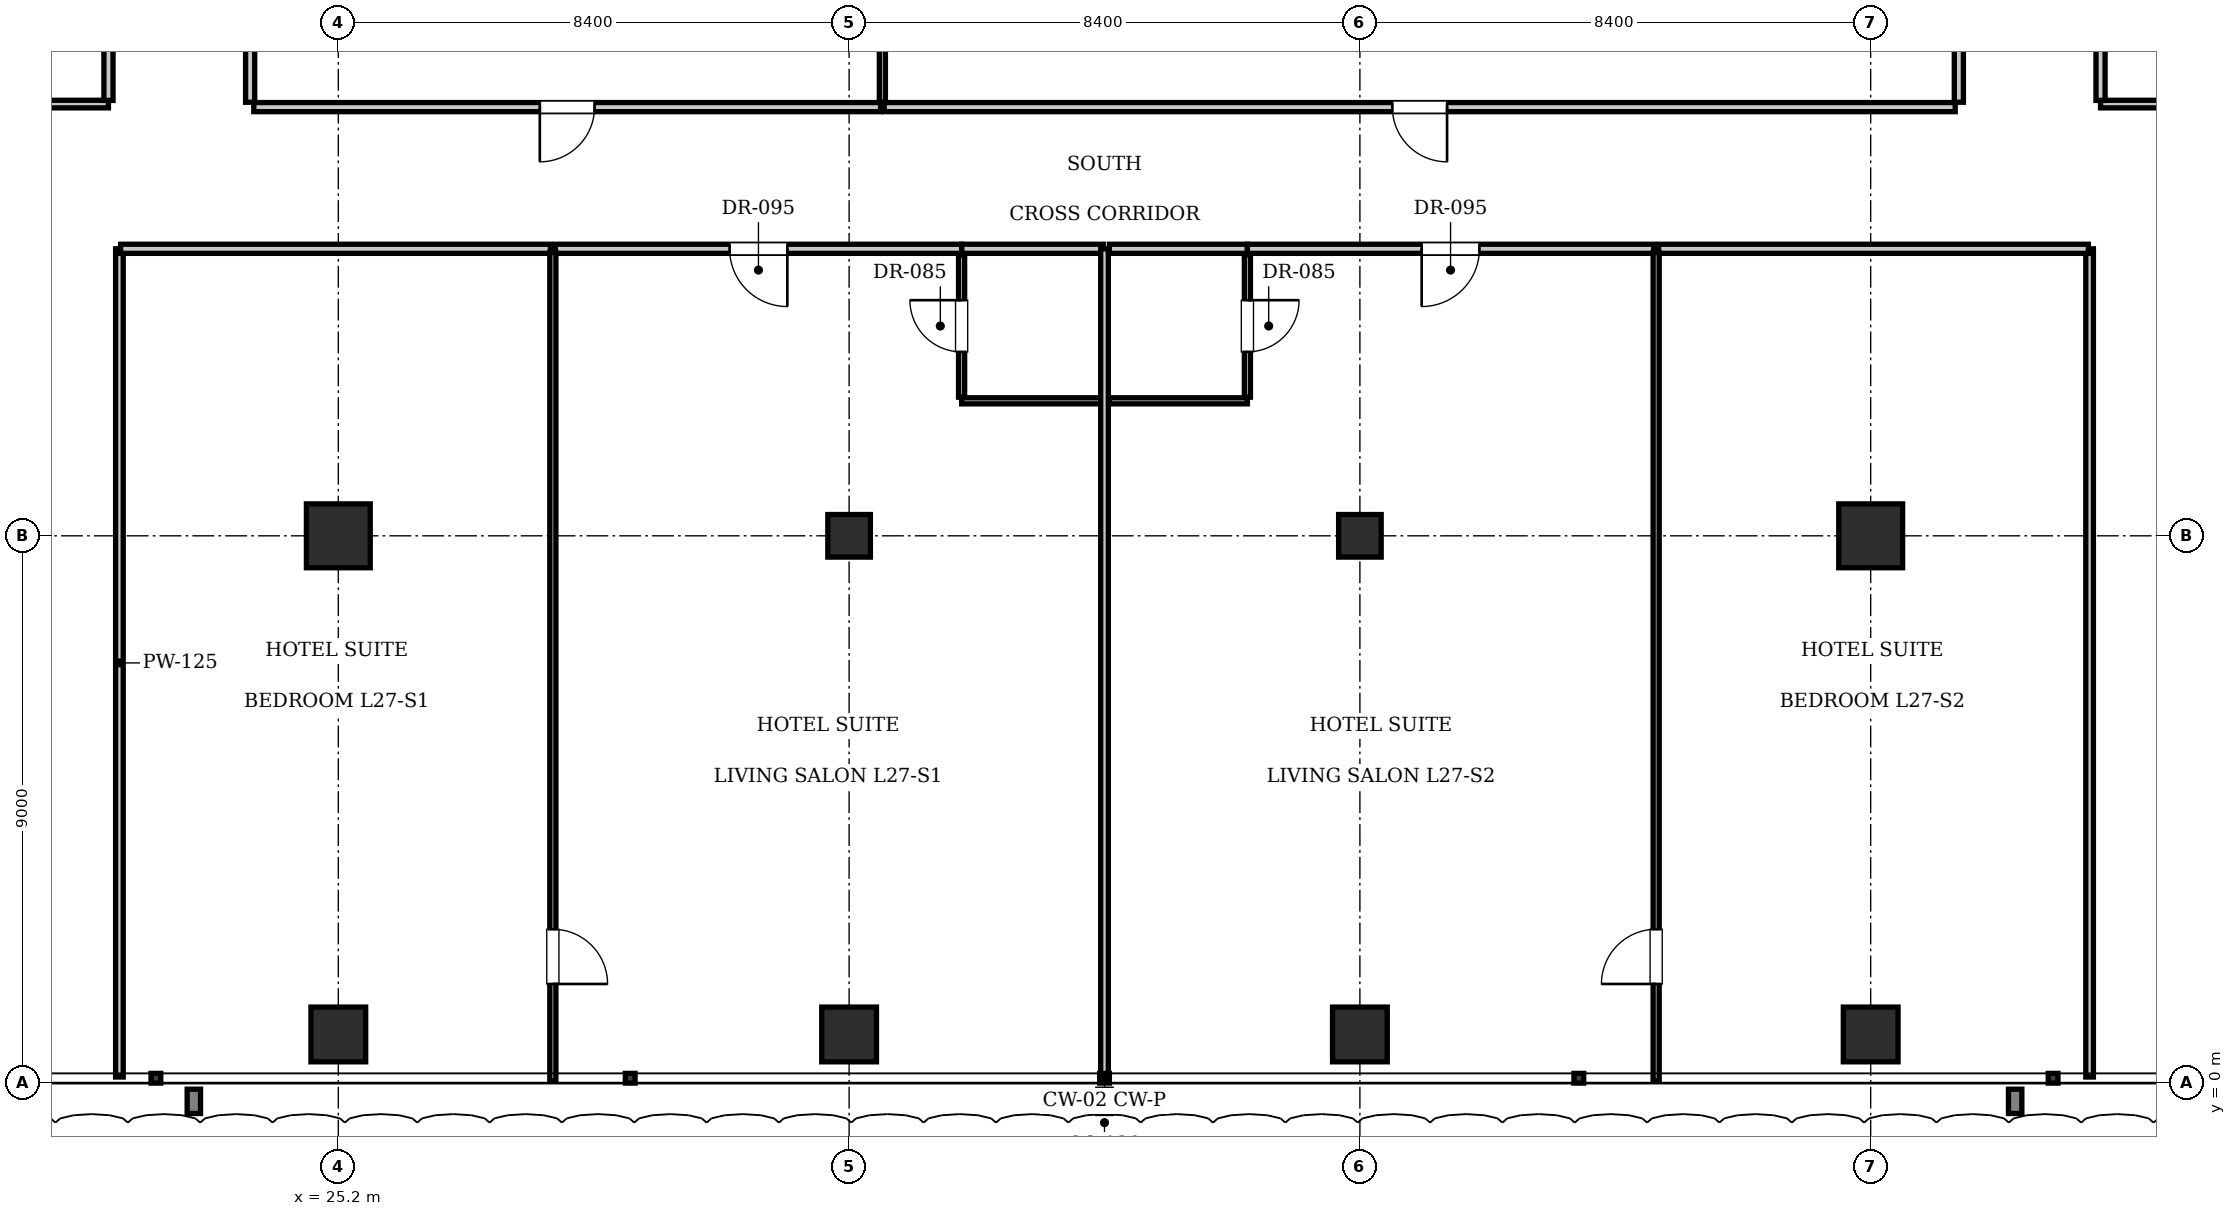
"""IFC4 building model, lengths in metres.
Left out: names, types, materials, properties, quantities, classifications, styles, units other than length and angle.
Written with IfcOpenShell. Run it as: python <this file> out.ifc"""

import sys

from ifc_helpers import new_model, si_unit, direction, frame, frame_2d, origin, origin_2d, place, context, subcontext, project, spatial, rectangle, i_section, extrude, element, fill, save


model = new_model("IFC4")
c1 = context("Model", 3, precision=1e-05, world=origin(), true_north=direction((0.0, 1.0)))
c2 = subcontext(c1, "Body", "Model", "MODEL_VIEW")
j1 = project(units=[si_unit("LENGTHUNIT", "METRE"), si_unit("PLANEANGLEUNIT", "RADIAN")], contexts=[c1])
p1 = place(None, origin())
s1 = spatial("IfcSite", under=j1, at=p1, CompositionType="ELEMENT")
p2 = place(p1, origin())
s2 = spatial("IfcBuilding", under=s1, at=p2, CompositionType="ELEMENT")
p3 = place(p2, frame((0.0, 0.0, 111.65)))
s3 = spatial("IfcBuildingStorey", under=s2, at=p3, CompositionType="ELEMENT", Elevation=111.65)
for number, where, z_axis, x_axis in (
    (1, (25.2, 9.0, 0.0), (0.0, 0.0, 1.0), (1.0, 0.0, 0.0)),
    (2, (50.4, 9.0, 0.0), (0.0, 0.0, 1.0), (1.0, 0.0, 0.0)),
):
    element("IfcColumn", number, at=place(p3, frame(where, z_axis=z_axis, x_axis=x_axis)), inside=s3, PredefinedType="COLUMN", context=c2, shape_type="SweptSolid", body=[
        extrude(rectangle(XDim=1.05, YDim=1.05, at=origin_2d()), origin(), (0.0, 0.0, 1.0), 3.85),
    ])
for number, where, z_axis, x_axis in (
    (3, (33.6, 9.0, 0.0), (0.0, 0.0, 1.0), (1.0, 0.0, 0.0)),
    (4, (42.0, 9.0, 0.0), (0.0, 0.0, 1.0), (1.0, 0.0, 0.0)),
):
    element("IfcColumn", number, at=place(p3, frame(where, z_axis=z_axis, x_axis=x_axis)), inside=s3, PredefinedType="COLUMN", context=c2, shape_type="SweptSolid", body=[
        extrude(i_section(OverallWidth=0.7, OverallDepth=0.7, WebThickness=0.028, FlangeThickness=0.044, at=origin_2d()), origin(), (0.0, 0.0, 1.0), 3.85),
    ])
for number, where, z_axis, x_axis in (
    (5, (25.2, 0.8, 0.0), (0.0, 0.0, 1.0), (1.0, 0.0, 0.0)),
    (6, (33.6, 0.8, 0.0), (0.0, 0.0, 1.0), (1.0, 0.0, 0.0)),
    (7, (42.0, 0.8, 0.0), (0.0, 0.0, 1.0), (1.0, 0.0, 0.0)),
    (8, (50.4, 0.8, 0.0), (0.0, 0.0, 1.0), (1.0, 0.0, 0.0)),
):
    element("IfcColumn", number, at=place(p3, frame(where, z_axis=z_axis, x_axis=x_axis)), inside=s3, PredefinedType="COLUMN", context=c2, shape_type="SweptSolid", body=[
        extrude(rectangle(XDim=0.9, YDim=0.9, at=origin_2d()), origin(), (0.0, 0.0, 1.0), 3.85),
    ])
for number, where, z_axis, x_axis in (
    (9, (23.75, 16.13, 0.0), (0.0, 0.0, 1.0), (0.0, 1.0, 0.0)),
    (10, (51.85, 16.13, 0.0), (0.0, 0.0, 1.0), (0.0, 1.0, 0.0)),
):
    element("IfcWall", number, at=place(p3, frame(where, z_axis=z_axis, x_axis=x_axis)), inside=s3, PredefinedType="PARTITIONING", context=c2, shape_type="SweptSolid", body=[
        extrude(rectangle(XDim=7.74, YDim=0.15, at=frame_2d((3.87, 0.0))), origin(), (0.0, 0.0, 1.0), 3.55),
    ])
p4 = place(p3, frame((23.81, 16.05, 0.0), z_axis=(0.0, 0.0, 1.0), x_axis=(1.0, 0.0, 0.0)))
e11 = element("IfcWall", 11, at=p4, inside=s3, PredefinedType="PARTITIONING", context=c2, shape_type="SweptSolid", body=[
    extrude(rectangle(XDim=10.307, YDim=0.15, at=frame_2d((5.153, 0.0))), origin(), (0.0, 0.0, 1.0), 3.55),
])
p5 = place(p4, frame((4.704, 0.0, 0.0)))
e12 = element("IfcOpeningElement", 12, at=p5, cuts=e11, PredefinedType="OPENING", context=c2, shape_type="SweptSolid", body=[
    extrude(rectangle(XDim=0.9, YDim=2.1, at=frame_2d((0.45, 1.05))), frame((0.0, 0.085, 0.0), z_axis=(0.0, -1.0, 0.0), x_axis=(1.0, 0.0, 0.0)), (0.0, 0.0, 1.0), 0.17),
])
p6 = place(p3, frame((34.147, 16.13, 0.0), z_axis=(0.0, 0.0, 1.0), x_axis=(0.0, 1.0, 0.0)))
e13 = element("IfcWall", 13, at=p6, inside=s3, PredefinedType="PARTITIONING", context=c2, shape_type="SweptSolid", body=[
    extrude(rectangle(XDim=7.74, YDim=0.1, at=frame_2d((3.87, 0.0))), origin(), (0.0, 0.0, 1.0), 3.55),
])
p7 = place(p3, frame((34.177, 16.05, 0.0), z_axis=(0.0, 0.0, 1.0), x_axis=(1.0, 0.0, 0.0)))
e14 = element("IfcWall", 14, at=p7, inside=s3, PredefinedType="PARTITIONING", context=c2, shape_type="SweptSolid", body=[
    extrude(rectangle(XDim=17.613, YDim=0.15, at=frame_2d((8.807, 0.0))), origin(), (0.0, 0.0, 1.0), 3.55),
])
p8 = place(p7, frame((8.356, 0.0, 0.0)))
e15 = element("IfcOpeningElement", 15, at=p8, cuts=e14, PredefinedType="OPENING", context=c2, shape_type="SweptSolid", body=[
    extrude(rectangle(XDim=0.9, YDim=2.1, at=frame_2d((0.45, 1.05))), frame((0.0, 0.085, 0.0), z_axis=(0.0, -1.0, 0.0), x_axis=(1.0, 0.0, 0.0)), (0.0, 0.0, 1.0), 0.17),
])
for number, where, z_axis, x_axis in (
    (16, (21.6, 0.1, 0.0), (0.0, 0.0, 1.0), (0.0, 1.0, 0.0)),
    (17, (54.0, 0.1, 0.0), (0.0, 0.0, 1.0), (0.0, 1.0, 0.0)),
):
    element("IfcWall", number, at=place(p3, frame(where, z_axis=z_axis, x_axis=x_axis)), inside=s3, PredefinedType="PARTITIONING", context=c2, shape_type="SweptSolid", body=[
        extrude(rectangle(XDim=13.62, YDim=0.125, at=frame_2d((6.81, 0.0))), origin(), (0.0, 0.0, 1.0), 3.55),
    ])
p9 = place(p3, frame((35.45, 13.72, 0.0), z_axis=(0.0, 0.0, 1.0), x_axis=(1.0, 0.0, 0.0)))
e18 = element("IfcWall", 18, at=p9, inside=s3, PredefinedType="PARTITIONING", context=c2, shape_type="SweptSolid", body=[
    extrude(rectangle(XDim=2.33, YDim=0.15, at=frame_2d((1.165, 0.0))), origin(), (0.0, 0.0, 1.0), 3.55),
])
p10 = place(p3, frame((35.45, 11.22, 0.0), z_axis=(0.0, 0.0, 1.0), x_axis=(1.0, 0.0, 0.0)))
e19 = element("IfcWall", 19, at=p10, inside=s3, PredefinedType="PARTITIONING", context=c2, shape_type="SweptSolid", body=[
    extrude(rectangle(XDim=2.31, YDim=0.1, at=frame_2d((1.155, 0.0))), origin(), (0.0, 0.0, 1.0), 3.55),
])
p11 = place(p3, frame((35.45, 11.28, 0.0), z_axis=(0.0, 0.0, 1.0), x_axis=(0.0, 1.0, 0.0)))
e20 = element("IfcWall", 20, at=p11, inside=s3, PredefinedType="PARTITIONING", context=c2, shape_type="SweptSolid", body=[
    extrude(rectangle(XDim=2.34, YDim=0.1, at=frame_2d((1.17, 0.0))), origin(), (0.0, 0.0, 1.0), 3.55),
])
p12 = place(p11, frame((0.745, 0.0, 0.0)))
e21 = element("IfcOpeningElement", 21, at=p12, cuts=e20, PredefinedType="OPENING", context=c2, shape_type="SweptSolid", body=[
    extrude(rectangle(XDim=0.85, YDim=2.1, at=frame_2d((0.425, 1.05))), frame((0.0, 0.06, 0.0), z_axis=(0.0, -1.0, 0.0), x_axis=(1.0, 0.0, 0.0)), (0.0, 0.0, 1.0), 0.12),
])
p13 = place(p3, frame((21.62, 13.72, 0.0), z_axis=(0.0, 0.0, 1.0), x_axis=(1.0, 0.0, 0.0)))
e22 = element("IfcWall", 22, at=p13, inside=s3, PredefinedType="PARTITIONING", context=c2, shape_type="SweptSolid", body=[
    extrude(rectangle(XDim=7.068, YDim=0.15, at=frame_2d((3.534, 0.0))), origin(), (0.0, 0.0, 1.0), 3.55),
])
p14 = place(p3, frame((28.768, 13.72, 0.0), z_axis=(0.0, 0.0, 1.0), x_axis=(1.0, 0.0, 0.0)))
e23 = element("IfcWall", 23, at=p14, inside=s3, PredefinedType="PARTITIONING", context=c2, shape_type="SweptSolid", body=[
    extrude(rectangle(XDim=6.682, YDim=0.15, at=frame_2d((3.341, 0.0))), origin(), (0.0, 0.0, 1.0), 3.55),
])
p15 = place(p14, frame((2.866, 0.0, 0.0)))
e24 = element("IfcOpeningElement", 24, at=p15, cuts=e23, PredefinedType="OPENING", context=c2, shape_type="SweptSolid", body=[
    extrude(rectangle(XDim=0.95, YDim=2.15, at=frame_2d((0.475, 1.075))), frame((0.0, 0.085, 0.0), z_axis=(0.0, -1.0, 0.0), x_axis=(1.0, 0.0, 0.0)), (0.0, 0.0, 1.0), 0.17),
])
p16 = place(p3, frame((28.728, 0.03, 0.0), z_axis=(0.0, 0.0, 1.0), x_axis=(0.0, 1.0, 0.0)))
e25 = element("IfcWall", 25, at=p16, inside=s3, PredefinedType="PARTITIONING", context=c2, shape_type="SweptSolid", body=[
    extrude(rectangle(XDim=13.63, YDim=0.1, at=frame_2d((6.815, 0.0))), origin(), (0.0, 0.0, 1.0), 3.55),
])
p17 = place(p16, frame((1.6, 0.0, 0.0)))
e26 = element("IfcOpeningElement", 26, at=p17, cuts=e25, PredefinedType="OPENING", context=c2, shape_type="SweptSolid", body=[
    extrude(rectangle(XDim=0.9, YDim=2.1, at=frame_2d((0.45, 1.05))), frame((0.0, 0.06, 0.0), z_axis=(0.0, -1.0, 0.0), x_axis=(1.0, 0.0, 0.0)), (0.0, 0.0, 1.0), 0.12),
])
p18 = place(p3, frame((37.8, 0.1, 0.0), z_axis=(0.0, 0.0, 1.0), x_axis=(0.0, 1.0, 0.0)))
e27 = element("IfcWall", 27, at=p18, inside=s3, PredefinedType="PARTITIONING", context=c2, shape_type="SweptSolid", body=[
    extrude(rectangle(XDim=13.62, YDim=0.125, at=frame_2d((6.81, 0.0))), origin(), (0.0, 0.0, 1.0), 3.147),
])
p19 = place(p3, frame((37.88, 13.72, 0.0), z_axis=(0.0, 0.0, 1.0), x_axis=(1.0, 0.0, 0.0)))
e28 = element("IfcWall", 28, at=p19, inside=s3, PredefinedType="PARTITIONING", context=c2, shape_type="SweptSolid", body=[
    extrude(rectangle(XDim=2.27, YDim=0.15, at=frame_2d((1.135, 0.0))), origin(), (0.0, 0.0, 1.0), 3.55),
])
p20 = place(p3, frame((37.88, 11.22, 0.0), z_axis=(0.0, 0.0, 1.0), x_axis=(1.0, 0.0, 0.0)))
e29 = element("IfcWall", 29, at=p20, inside=s3, PredefinedType="PARTITIONING", context=c2, shape_type="SweptSolid", body=[
    extrude(rectangle(XDim=2.27, YDim=0.1, at=frame_2d((1.135, 0.0))), origin(), (0.0, 0.0, 1.0), 3.55),
])
p21 = place(p3, frame((40.15, 11.28, 0.0), z_axis=(0.0, 0.0, 1.0), x_axis=(0.0, 1.0, 0.0)))
e30 = element("IfcWall", 30, at=p21, inside=s3, PredefinedType="PARTITIONING", context=c2, shape_type="SweptSolid", body=[
    extrude(rectangle(XDim=2.34, YDim=0.1, at=frame_2d((1.17, 0.0))), origin(), (0.0, 0.0, 1.0), 3.55),
])
p22 = place(p21, frame((0.745, 0.0, 0.0)))
e31 = element("IfcOpeningElement", 31, at=p22, cuts=e30, PredefinedType="OPENING", context=c2, shape_type="SweptSolid", body=[
    extrude(rectangle(XDim=0.85, YDim=2.1, at=frame_2d((0.425, 1.05))), frame((0.0, 0.06, 0.0), z_axis=(0.0, -1.0, 0.0), x_axis=(1.0, 0.0, 0.0)), (0.0, 0.0, 1.0), 0.12),
])
p23 = place(p3, frame((40.15, 13.72, 0.0), z_axis=(0.0, 0.0, 1.0), x_axis=(1.0, 0.0, 0.0)))
e32 = element("IfcWall", 32, at=p23, inside=s3, PredefinedType="PARTITIONING", context=c2, shape_type="SweptSolid", body=[
    extrude(rectangle(XDim=6.682, YDim=0.15, at=frame_2d((3.341, 0.0))), origin(), (0.0, 0.0, 1.0), 3.55),
])
p24 = place(p23, frame((2.866, 0.0, 0.0)))
e33 = element("IfcOpeningElement", 33, at=p24, cuts=e32, PredefinedType="OPENING", context=c2, shape_type="SweptSolid", body=[
    extrude(rectangle(XDim=0.95, YDim=2.15, at=frame_2d((0.475, 1.075))), frame((0.0, 0.085, 0.0), z_axis=(0.0, -1.0, 0.0), x_axis=(1.0, 0.0, 0.0)), (0.0, 0.0, 1.0), 0.17),
])
p25 = place(p3, frame((46.912, 13.72, 0.0), z_axis=(0.0, 0.0, 1.0), x_axis=(1.0, 0.0, 0.0)))
e34 = element("IfcWall", 34, at=p25, inside=s3, PredefinedType="PARTITIONING", context=c2, shape_type="SweptSolid", body=[
    extrude(rectangle(XDim=7.068, YDim=0.15, at=frame_2d((3.534, 0.0))), origin(), (0.0, 0.0, 1.0), 3.55),
])
p26 = place(p3, frame((46.872, 0.03, 0.0), z_axis=(0.0, 0.0, 1.0), x_axis=(0.0, 1.0, 0.0)))
e35 = element("IfcWall", 35, at=p26, inside=s3, PredefinedType="PARTITIONING", context=c2, shape_type="SweptSolid", body=[
    extrude(rectangle(XDim=13.63, YDim=0.1, at=frame_2d((6.815, 0.0))), origin(), (0.0, 0.0, 1.0), 3.55),
])
p27 = place(p26, frame((1.6, 0.0, 0.0)))
e36 = element("IfcOpeningElement", 36, at=p27, cuts=e35, PredefinedType="OPENING", context=c2, shape_type="SweptSolid", body=[
    extrude(rectangle(XDim=0.9, YDim=2.1, at=frame_2d((0.45, 1.05))), frame((0.0, 0.06, 0.0), z_axis=(0.0, -1.0, 0.0), x_axis=(1.0, 0.0, 0.0)), (0.0, 0.0, 1.0), 0.12),
])
for number, where, z_axis, x_axis in (
    (37, (10.9, 16.1, 0.0), (0.0, 0.0, 1.0), (1.0, 0.0, 0.0)),
    (38, (54.18, 16.1, 0.0), (0.0, 0.0, 1.0), (1.0, 0.0, 0.0)),
):
    element("IfcWall", number, at=place(p3, frame(where, z_axis=z_axis, x_axis=x_axis)), inside=s3, PredefinedType="PARTITIONING", context=c2, shape_type="SweptSolid", body=[
        extrude(rectangle(XDim=10.52, YDim=0.125, at=frame_2d((5.26, 0.0))), origin(), (0.0, 0.0, 1.0), 3.55),
    ])
p28 = place(p3, frame((21.42, 16.16, 0.0), z_axis=(0.0, 0.0, 1.0), x_axis=(0.0, 1.0, 0.0)))
e39 = element("IfcWall", 39, at=p28, inside=s3, PredefinedType="PARTITIONING", context=c2, shape_type="SweptSolid", body=[
    extrude(rectangle(XDim=5.54, YDim=0.15, at=frame_2d((2.77, 0.0))), origin(), (0.0, 0.0, 1.0), 3.55),
])
p29 = place(p28, frame((2.295, 0.0, 0.0)))
e40 = element("IfcOpeningElement", 40, at=p29, cuts=e39, PredefinedType="OPENING", context=c2, shape_type="SweptSolid", body=[
    extrude(rectangle(XDim=0.95, YDim=2.15, at=frame_2d((0.475, 1.075))), frame((0.0, 0.085, 0.0), z_axis=(0.0, -1.0, 0.0), x_axis=(1.0, 0.0, 0.0)), (0.0, 0.0, 1.0), 0.17),
])
p30 = place(p3, frame((54.18, 16.16, 0.0), z_axis=(0.0, 0.0, 1.0), x_axis=(0.0, 1.0, 0.0)))
e41 = element("IfcWall", 41, at=p30, inside=s3, PredefinedType="PARTITIONING", context=c2, shape_type="SweptSolid", body=[
    extrude(rectangle(XDim=5.54, YDim=0.15, at=frame_2d((2.77, 0.0))), origin(), (0.0, 0.0, 1.0), 3.55),
])
p31 = place(p30, frame((2.295, 0.0, 0.0)))
e42 = element("IfcOpeningElement", 42, at=p31, cuts=e41, PredefinedType="OPENING", context=c2, shape_type="SweptSolid", body=[
    extrude(rectangle(XDim=0.95, YDim=2.15, at=frame_2d((0.475, 1.075))), frame((0.0, 0.085, 0.0), z_axis=(0.0, -1.0, 0.0), x_axis=(1.0, 0.0, 0.0)), (0.0, 0.0, 1.0), 0.17),
])
p32 = place(p5, frame((0.9, 0.0, 0.0), z_axis=(0.0, 0.0, 1.0), x_axis=(-1.0, 0.0, 0.0)))
e43 = element("IfcDoor", 43, at=p32, inside=s3, OperationType="SINGLE_SWING_RIGHT", PredefinedType="DOOR", context=c2, shape_type="SweptSolid", body=[
    extrude(rectangle(XDim=0.9, YDim=2.1, at=frame_2d((0.45, 1.05))), frame((0.0, 0.025, 0.0), z_axis=(0.0, -1.0, 0.0), x_axis=(1.0, 0.0, 0.0)), (0.0, 0.0, 1.0), 0.05),
])
fill(e12, e43)
p33 = place(p8, frame((0.9, 0.0, 0.0), z_axis=(0.0, 0.0, 1.0), x_axis=(-1.0, 0.0, 0.0)))
e44 = element("IfcDoor", 44, at=p33, inside=s3, OperationType="SINGLE_SWING_LEFT", PredefinedType="DOOR", context=c2, shape_type="SweptSolid", body=[
    extrude(rectangle(XDim=0.9, YDim=2.1, at=frame_2d((0.45, 1.05))), frame((0.0, 0.025, 0.0), z_axis=(0.0, -1.0, 0.0), x_axis=(1.0, 0.0, 0.0)), (0.0, 0.0, 1.0), 0.05),
])
fill(e15, e44)
p34 = place(p12, origin())
e45 = element("IfcDoor", 45, at=p34, inside=s3, OperationType="SINGLE_SWING_RIGHT", PredefinedType="DOOR", context=c2, shape_type="SweptSolid", body=[
    extrude(rectangle(XDim=0.85, YDim=2.1, at=frame_2d((0.425, 1.05))), frame((0.0, 0.025, 0.0), z_axis=(0.0, -1.0, 0.0), x_axis=(1.0, 0.0, 0.0)), (0.0, 0.0, 1.0), 0.05),
])
fill(e21, e45)
p35 = place(p15, frame((0.95, 0.0, 0.0), z_axis=(0.0, 0.0, 1.0), x_axis=(-1.0, 0.0, 0.0)))
e46 = element("IfcDoor", 46, at=p35, inside=s3, OperationType="SINGLE_SWING_LEFT", PredefinedType="DOOR", context=c2, shape_type="SweptSolid", body=[
    extrude(rectangle(XDim=0.95, YDim=2.15, at=frame_2d((0.475, 1.075))), frame((0.0, 0.025, 0.0), z_axis=(0.0, -1.0, 0.0), x_axis=(1.0, 0.0, 0.0)), (0.0, 0.0, 1.0), 0.05),
])
fill(e24, e46)
p36 = place(p17, frame((0.9, 0.0, 0.0), z_axis=(0.0, 0.0, 1.0), x_axis=(-1.0, 0.0, 0.0)))
e47 = element("IfcDoor", 47, at=p36, inside=s3, OperationType="SINGLE_SWING_RIGHT", PredefinedType="DOOR", context=c2, shape_type="SweptSolid", body=[
    extrude(rectangle(XDim=0.9, YDim=2.1, at=frame_2d((0.45, 1.05))), frame((0.0, 0.025, 0.0), z_axis=(0.0, -1.0, 0.0), x_axis=(1.0, 0.0, 0.0)), (0.0, 0.0, 1.0), 0.05),
])
fill(e26, e47)
p37 = place(p22, frame((0.85, 0.0, 0.0), z_axis=(0.0, 0.0, 1.0), x_axis=(-1.0, 0.0, 0.0)))
e48 = element("IfcDoor", 48, at=p37, inside=s3, OperationType="SINGLE_SWING_LEFT", PredefinedType="DOOR", context=c2, shape_type="SweptSolid", body=[
    extrude(rectangle(XDim=0.85, YDim=2.1, at=frame_2d((0.425, 1.05))), frame((0.0, 0.025, 0.0), z_axis=(0.0, -1.0, 0.0), x_axis=(1.0, 0.0, 0.0)), (0.0, 0.0, 1.0), 0.05),
])
fill(e31, e48)
p38 = place(p24, frame((0.95, 0.0, 0.0), z_axis=(0.0, 0.0, 1.0), x_axis=(-1.0, 0.0, 0.0)))
e49 = element("IfcDoor", 49, at=p38, inside=s3, OperationType="SINGLE_SWING_RIGHT", PredefinedType="DOOR", context=c2, shape_type="SweptSolid", body=[
    extrude(rectangle(XDim=0.95, YDim=2.15, at=frame_2d((0.475, 1.075))), frame((0.0, 0.025, 0.0), z_axis=(0.0, -1.0, 0.0), x_axis=(1.0, 0.0, 0.0)), (0.0, 0.0, 1.0), 0.05),
])
fill(e33, e49)
p39 = place(p27, origin())
e50 = element("IfcDoor", 50, at=p39, inside=s3, OperationType="SINGLE_SWING_LEFT", PredefinedType="DOOR", context=c2, shape_type="SweptSolid", body=[
    extrude(rectangle(XDim=0.9, YDim=2.1, at=frame_2d((0.45, 1.05))), frame((0.0, 0.025, 0.0), z_axis=(0.0, -1.0, 0.0), x_axis=(1.0, 0.0, 0.0)), (0.0, 0.0, 1.0), 0.05),
])
fill(e36, e50)
save(model, sys.argv[1])
